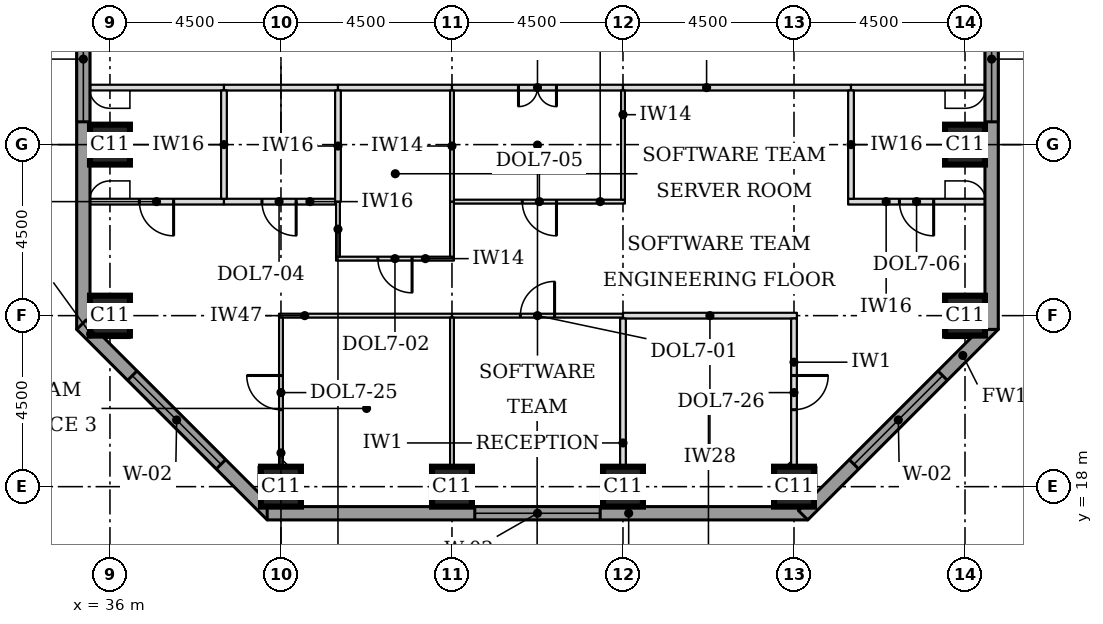
"""IFC4 building model, lengths in metres.
Left out: names, types, materials, properties, quantities, classifications, styles, units other than length and angle.
Written with IfcOpenShell. Run it as: python <this file> out.ifc"""

import sys

from ifc_helpers import new_model, si_unit, direction, frame, frame_2d, origin, origin_2d, place, context, subcontext, project, spatial, rectangle, extrude, element, fill, save


model = new_model("IFC4")
c1 = context("Model", 3, precision=1e-05, world=origin(), true_north=direction((0.0, 1.0)))
c2 = subcontext(c1, "Body", "Model", "MODEL_VIEW")
j1 = project(units=[si_unit("LENGTHUNIT", "METRE"), si_unit("PLANEANGLEUNIT", "RADIAN")], contexts=[c1])
p1 = place(None, origin())
s1 = spatial("IfcSite", under=j1, at=p1, CompositionType="ELEMENT")
p2 = place(p1, origin())
s2 = spatial("IfcBuilding", under=s1, at=p2, CompositionType="ELEMENT")
p3 = place(p2, frame((0.0, 0.0, 134.4)))
s3 = spatial("IfcBuildingStorey", under=s2, at=p3, CompositionType="ELEMENT", Elevation=134.4)
for number, where, z_axis, x_axis in (
    (1, (40.5, 18.0, 0.0), (0.0, 0.0, 1.0), (1.0, 0.0, 0.0)),
    (2, (45.0, 18.0, 0.0), (0.0, 0.0, 1.0), (1.0, 0.0, 0.0)),
    (3, (49.5, 18.0, 0.0), (0.0, 0.0, 1.0), (1.0, 0.0, 0.0)),
    (4, (54.0, 18.0, 0.0), (0.0, 0.0, 1.0), (1.0, 0.0, 0.0)),
    (5, (36.0, 22.5, 0.0), (0.0, 0.0, 1.0), (1.0, 0.0, 0.0)),
    (6, (58.5, 22.5, 0.0), (0.0, 0.0, 1.0), (1.0, 0.0, 0.0)),
    (7, (36.0, 27.0, 0.0), (0.0, 0.0, 1.0), (1.0, 0.0, 0.0)),
    (8, (58.5, 27.0, 0.0), (0.0, 0.0, 1.0), (1.0, 0.0, 0.0)),
):
    element("IfcColumn", number, at=place(p3, frame(where, z_axis=z_axis, x_axis=x_axis)), inside=s3, PredefinedType="COLUMN", context=c2, shape_type="SweptSolid", body=[
        extrude(rectangle(XDim=1.05, YDim=1.05, at=origin_2d()), origin(), (0.0, 0.0, 1.0), 3.7),
    ])
p4 = place(p3, frame((35.3, 39.975, 0.0), z_axis=(0.0, 0.0, 1.0), x_axis=(0.0, -1.0, 0.0)))
e9 = element("IfcWall", 9, at=p4, inside=s3, PredefinedType="STANDARD", context=c2, shape_type="SweptSolid", body=[
    extrude(rectangle(XDim=17.837, YDim=0.35, at=frame_2d((8.919, 0.0))), origin(), (0.0, 0.0, 1.0), 3.525),
])
p5 = place(p4, frame((0.5, 0.0, 0.9)))
e10 = element("IfcOpeningElement", 10, at=p5, cuts=e9, PredefinedType="OPENING", context=c2, shape_type="SweptSolid", body=[
    extrude(rectangle(XDim=3.3, YDim=1.9, at=frame_2d((1.65, 0.95))), frame((0.0, 0.185, 0.0), z_axis=(0.0, -1.0, 0.0), x_axis=(1.0, 0.0, 0.0)), (0.0, 0.0, 1.0), 0.37),
])
p6 = place(p4, frame((9.075, 0.0, 0.9)))
e11 = element("IfcOpeningElement", 11, at=p6, cuts=e9, PredefinedType="OPENING", context=c2, shape_type="SweptSolid", body=[
    extrude(rectangle(XDim=3.3, YDim=1.9, at=frame_2d((1.65, 0.95))), frame((0.0, 0.185, 0.0), z_axis=(0.0, -1.0, 0.0), x_axis=(1.0, 0.0, 0.0)), (0.0, 0.0, 1.0), 0.37),
])
p7 = place(p3, frame((35.249, 22.261, 0.0), z_axis=(0.0, 0.0, 1.0), x_axis=(0.707106781187, -0.707106781187, 0.0)))
e12 = element("IfcWall", 12, at=p7, inside=s3, PredefinedType="STANDARD", context=c2, shape_type="SweptSolid", body=[
    extrude(rectangle(XDim=7.089, YDim=0.35, at=frame_2d((3.544, 0.0))), origin(), (0.0, 0.0, 1.0), 3.525),
])
p8 = place(p7, frame((1.894, 0.0, 0.9)))
e13 = element("IfcOpeningElement", 13, at=p8, cuts=e12, PredefinedType="OPENING", context=c2, shape_type="SweptSolid", body=[
    extrude(rectangle(XDim=3.3, YDim=1.9, at=frame_2d((1.65, 0.95))), frame((0.0, 0.185, 0.0), z_axis=(0.0, -1.0, 0.0), x_axis=(1.0, 0.0, 0.0)), (0.0, 0.0, 1.0), 0.37),
])
p9 = place(p3, frame((40.138, 17.3, 0.0), z_axis=(0.0, 0.0, 1.0), x_axis=(1.0, 0.0, 0.0)))
e14 = element("IfcWall", 14, at=p9, inside=s3, PredefinedType="STANDARD", context=c2, shape_type="SweptSolid", body=[
    extrude(rectangle(XDim=14.225, YDim=0.35, at=frame_2d((7.112, 0.0))), origin(), (0.0, 0.0, 1.0), 3.525),
])
p10 = place(p9, frame((5.462, 0.0, 0.9)))
e15 = element("IfcOpeningElement", 15, at=p10, cuts=e14, PredefinedType="OPENING", context=c2, shape_type="SweptSolid", body=[
    extrude(rectangle(XDim=3.3, YDim=1.9, at=frame_2d((1.65, 0.95))), frame((0.0, 0.185, 0.0), z_axis=(0.0, -1.0, 0.0), x_axis=(1.0, 0.0, 0.0)), (0.0, 0.0, 1.0), 0.37),
])
p11 = place(p3, frame((54.239, 17.249, 0.0), z_axis=(0.0, 0.0, 1.0), x_axis=(0.707106781187, 0.707106781187, 0.0)))
e16 = element("IfcWall", 16, at=p11, inside=s3, PredefinedType="STANDARD", context=c2, shape_type="SweptSolid", body=[
    extrude(rectangle(XDim=7.089, YDim=0.35, at=frame_2d((3.544, 0.0))), origin(), (0.0, 0.0, 1.0), 3.525),
])
p12 = place(p11, frame((1.894, 0.0, 0.9)))
e17 = element("IfcOpeningElement", 17, at=p12, cuts=e16, PredefinedType="OPENING", context=c2, shape_type="SweptSolid", body=[
    extrude(rectangle(XDim=3.3, YDim=1.9, at=frame_2d((1.65, 0.95))), frame((0.0, 0.185, 0.0), z_axis=(0.0, -1.0, 0.0), x_axis=(1.0, 0.0, 0.0)), (0.0, 0.0, 1.0), 0.37),
])
p13 = place(p3, frame((59.2, 22.138, 0.0), z_axis=(0.0, 0.0, 1.0), x_axis=(0.0, 1.0, 0.0)))
e18 = element("IfcWall", 18, at=p13, inside=s3, PredefinedType="STANDARD", context=c2, shape_type="SweptSolid", body=[
    extrude(rectangle(XDim=17.837, YDim=0.35, at=frame_2d((8.919, 0.0))), origin(), (0.0, 0.0, 1.0), 3.525),
])
p14 = place(p13, frame((5.462, 0.0, 0.9)))
e19 = element("IfcOpeningElement", 19, at=p14, cuts=e18, PredefinedType="OPENING", context=c2, shape_type="SweptSolid", body=[
    extrude(rectangle(XDim=3.3, YDim=1.9, at=frame_2d((1.65, 0.95))), frame((0.0, 0.185, 0.0), z_axis=(0.0, -1.0, 0.0), x_axis=(1.0, 0.0, 0.0)), (0.0, 0.0, 1.0), 0.37),
])
p15 = place(p13, frame((14.037, 0.0, 0.9)))
e20 = element("IfcOpeningElement", 20, at=p15, cuts=e18, PredefinedType="OPENING", context=c2, shape_type="SweptSolid", body=[
    extrude(rectangle(XDim=3.3, YDim=1.9, at=frame_2d((1.65, 0.95))), frame((0.0, 0.185, 0.0), z_axis=(0.0, -1.0, 0.0), x_axis=(1.0, 0.0, 0.0)), (0.0, 0.0, 1.0), 0.37),
])
p16 = place(p3, frame((40.45, 22.5, 0.0), z_axis=(0.0, 0.0, 1.0), x_axis=(1.0, 0.0, 0.0)))
e21 = element("IfcWall", 21, at=p16, inside=s3, PredefinedType="PARTITIONING", context=c2, shape_type="SweptSolid", body=[
    extrude(rectangle(XDim=4.55, YDim=0.1, at=frame_2d((2.275, 0.0))), origin(), (0.0, 0.0, 1.0), 2.55),
])
p17 = place(p3, frame((45.0, 22.5, 0.0), z_axis=(0.0, 0.0, 1.0), x_axis=(1.0, 0.0, 0.0)))
e22 = element("IfcWall", 22, at=p17, inside=s3, PredefinedType="PARTITIONING", context=c2, shape_type="SweptSolid", body=[
    extrude(rectangle(XDim=4.5, YDim=0.1, at=frame_2d((2.25, 0.0))), origin(), (0.0, 0.0, 1.0), 2.55),
])
p18 = place(p17, frame((1.8, 0.0, 0.0)))
e23 = element("IfcOpeningElement", 23, at=p18, cuts=e22, PredefinedType="OPENING", context=c2, shape_type="SweptSolid", body=[
    extrude(rectangle(XDim=0.9, YDim=2.1, at=frame_2d((0.45, 1.05))), frame((0.0, 0.06, 0.0), z_axis=(0.0, -1.0, 0.0), x_axis=(1.0, 0.0, 0.0)), (0.0, 0.0, 1.0), 0.12),
])
p19 = place(p3, frame((49.5, 22.5, 0.0), z_axis=(0.0, 0.0, 1.0), x_axis=(1.0, 0.0, 0.0)))
e24 = element("IfcWall", 24, at=p19, inside=s3, PredefinedType="PARTITIONING", context=c2, shape_type="SweptSolid", body=[
    extrude(rectangle(XDim=4.575, YDim=0.15, at=frame_2d((2.288, 0.0))), origin(), (0.0, 0.0, 1.0), 2.55),
])
p20 = place(p3, frame((41.95, 24.0, 0.0), z_axis=(0.0, 0.0, 1.0), x_axis=(1.0, 0.0, 0.0)))
e25 = element("IfcWall", 25, at=p20, inside=s3, PredefinedType="PARTITIONING", context=c2, shape_type="SweptSolid", body=[
    extrude(rectangle(XDim=3.1, YDim=0.1, at=frame_2d((1.55, 0.0))), origin(), (0.0, 0.0, 1.0), 3.55),
])
p21 = place(p20, frame((1.1, 0.0, 0.0)))
e26 = element("IfcOpeningElement", 26, at=p21, cuts=e25, PredefinedType="OPENING", context=c2, shape_type="SweptSolid", body=[
    extrude(rectangle(XDim=0.9, YDim=2.1, at=frame_2d((0.45, 1.05))), frame((0.0, 0.06, 0.0), z_axis=(0.0, -1.0, 0.0), x_axis=(1.0, 0.0, 0.0)), (0.0, 0.0, 1.0), 0.12),
])
p22 = place(p3, frame((35.475, 25.5, 0.0), z_axis=(0.0, 0.0, 1.0), x_axis=(1.0, 0.0, 0.0)))
e27 = element("IfcWall", 27, at=p22, inside=s3, PredefinedType="PARTITIONING", context=c2, shape_type="SweptSolid", body=[
    extrude(rectangle(XDim=3.525, YDim=0.15, at=frame_2d((1.762, 0.0))), origin(), (0.0, 0.0, 1.0), 3.55),
])
p23 = place(p22, frame((1.3, 0.0, 0.0)))
e28 = element("IfcOpeningElement", 28, at=p23, cuts=e27, PredefinedType="OPENING", context=c2, shape_type="SweptSolid", body=[
    extrude(rectangle(XDim=0.9, YDim=2.1, at=frame_2d((0.45, 1.05))), frame((0.0, 0.085, 0.0), z_axis=(0.0, -1.0, 0.0), x_axis=(1.0, 0.0, 0.0)), (0.0, 0.0, 1.0), 0.17),
])
p24 = place(p3, frame((39.0, 25.5, 0.0), z_axis=(0.0, 0.0, 1.0), x_axis=(1.0, 0.0, 0.0)))
e29 = element("IfcWall", 29, at=p24, inside=s3, PredefinedType="PARTITIONING", context=c2, shape_type="SweptSolid", body=[
    extrude(rectangle(XDim=2.925, YDim=0.15, at=frame_2d((1.462, 0.0))), origin(), (0.0, 0.0, 1.0), 3.55),
])
p25 = place(p24, frame((1.0, 0.0, 0.0)))
e30 = element("IfcOpeningElement", 30, at=p25, cuts=e29, PredefinedType="OPENING", context=c2, shape_type="SweptSolid", body=[
    extrude(rectangle(XDim=0.9, YDim=2.1, at=frame_2d((0.45, 1.05))), frame((0.0, 0.085, 0.0), z_axis=(0.0, -1.0, 0.0), x_axis=(1.0, 0.0, 0.0)), (0.0, 0.0, 1.0), 0.17),
])
p26 = place(p3, frame((45.05, 25.5, 0.0), z_axis=(0.0, 0.0, 1.0), x_axis=(1.0, 0.0, 0.0)))
e31 = element("IfcWall", 31, at=p26, inside=s3, PredefinedType="PARTITIONING", context=c2, shape_type="SweptSolid", body=[
    extrude(rectangle(XDim=4.5, YDim=0.1, at=frame_2d((2.25, 0.0))), origin(), (0.0, 0.0, 1.0), 3.55),
])
p27 = place(p26, frame((1.8, 0.0, 0.0)))
e32 = element("IfcOpeningElement", 32, at=p27, cuts=e31, PredefinedType="OPENING", context=c2, shape_type="SweptSolid", body=[
    extrude(rectangle(XDim=0.9, YDim=2.1, at=frame_2d((0.45, 1.05))), frame((0.0, 0.06, 0.0), z_axis=(0.0, -1.0, 0.0), x_axis=(1.0, 0.0, 0.0)), (0.0, 0.0, 1.0), 0.12),
])
p28 = place(p3, frame((55.425, 25.5, 0.0), z_axis=(0.0, 0.0, 1.0), x_axis=(1.0, 0.0, 0.0)))
e33 = element("IfcWall", 33, at=p28, inside=s3, PredefinedType="PARTITIONING", context=c2, shape_type="SweptSolid", body=[
    extrude(rectangle(XDim=3.6, YDim=0.15, at=frame_2d((1.8, 0.0))), origin(), (0.0, 0.0, 1.0), 3.55),
])
p29 = place(p28, frame((1.35, 0.0, 0.0)))
e34 = element("IfcOpeningElement", 34, at=p29, cuts=e33, PredefinedType="OPENING", context=c2, shape_type="SweptSolid", body=[
    extrude(rectangle(XDim=0.9, YDim=2.1, at=frame_2d((0.45, 1.05))), frame((0.0, 0.085, 0.0), z_axis=(0.0, -1.0, 0.0), x_axis=(1.0, 0.0, 0.0)), (0.0, 0.0, 1.0), 0.17),
])
p30 = place(p3, frame((35.475, 28.5, 0.0), z_axis=(0.0, 0.0, 1.0), x_axis=(1.0, 0.0, 0.0)))
e35 = element("IfcWall", 35, at=p30, inside=s3, PredefinedType="PARTITIONING", context=c2, shape_type="SweptSolid", body=[
    extrude(rectangle(XDim=3.525, YDim=0.15, at=frame_2d((1.762, 0.0))), origin(), (0.0, 0.0, 1.0), 3.55),
])
for number, where, z_axis, x_axis in (
    (36, (39.0, 28.5, 0.0), (0.0, 0.0, 1.0), (1.0, 0.0, 0.0)),
    (37, (42.0, 28.5, 0.0), (0.0, 0.0, 1.0), (1.0, 0.0, 0.0)),
):
    element("IfcWall", number, at=place(p3, frame(where, z_axis=z_axis, x_axis=x_axis)), inside=s3, PredefinedType="PARTITIONING", context=c2, shape_type="SweptSolid", body=[
        extrude(rectangle(XDim=3.0, YDim=0.15, at=frame_2d((1.5, 0.0))), origin(), (0.0, 0.0, 1.0), 3.55),
    ])
p31 = place(p3, frame((45.0, 28.5, 0.0), z_axis=(0.0, 0.0, 1.0), x_axis=(1.0, 0.0, 0.0)))
e38 = element("IfcWall", 38, at=p31, inside=s3, PredefinedType="PARTITIONING", context=c2, shape_type="SweptSolid", body=[
    extrude(rectangle(XDim=4.5, YDim=0.15, at=frame_2d((2.25, 0.0))), origin(), (0.0, 0.0, 1.0), 3.55),
])
p32 = place(p31, frame((1.75, 0.0, 0.0)))
e39 = element("IfcOpeningElement", 39, at=p32, cuts=e38, PredefinedType="OPENING", context=c2, shape_type="SweptSolid", body=[
    extrude(rectangle(XDim=1.0, YDim=2.1, at=frame_2d((0.5, 1.05))), frame((0.0, 0.085, 0.0), z_axis=(0.0, -1.0, 0.0), x_axis=(1.0, 0.0, 0.0)), (0.0, 0.0, 1.0), 0.17),
])
p33 = place(p3, frame((49.5, 28.5, 0.0), z_axis=(0.0, 0.0, 1.0), x_axis=(1.0, 0.0, 0.0)))
e40 = element("IfcWall", 40, at=p33, inside=s3, PredefinedType="PARTITIONING", context=c2, shape_type="SweptSolid", body=[
    extrude(rectangle(XDim=6.0, YDim=0.15, at=frame_2d((3.0, 0.0))), origin(), (0.0, 0.0, 1.0), 3.55),
])
p34 = place(p3, frame((55.5, 28.5, 0.0), z_axis=(0.0, 0.0, 1.0), x_axis=(1.0, 0.0, 0.0)))
e41 = element("IfcWall", 41, at=p34, inside=s3, PredefinedType="PARTITIONING", context=c2, shape_type="SweptSolid", body=[
    extrude(rectangle(XDim=3.525, YDim=0.15, at=frame_2d((1.762, 0.0))), origin(), (0.0, 0.0, 1.0), 3.55),
])
p35 = place(p3, frame((45.0, 17.475, 0.0), z_axis=(0.0, 0.0, 1.0), x_axis=(0.0, 1.0, 0.0)))
e42 = element("IfcWall", 42, at=p35, inside=s3, PredefinedType="PARTITIONING", context=c2, shape_type="SweptSolid", body=[
    extrude(rectangle(XDim=4.975, YDim=0.1, at=frame_2d((2.487, 0.0))), origin(), (0.0, 0.0, 1.0), 3.55),
])
p36 = place(p3, frame((49.5, 17.475, 0.0), z_axis=(0.0, 0.0, 1.0), x_axis=(0.0, 1.0, 0.0)))
e43 = element("IfcWall", 43, at=p36, inside=s3, PredefinedType="PARTITIONING", context=c2, shape_type="SweptSolid", body=[
    extrude(rectangle(XDim=4.95, YDim=0.15, at=frame_2d((2.475, 0.0))), origin(), (0.0, 0.0, 1.0), 3.55),
])
p37 = place(p3, frame((40.5, 18.525, 0.0), z_axis=(0.0, 0.0, 1.0), x_axis=(0.0, 1.0, 0.0)))
e44 = element("IfcWall", 44, at=p37, inside=s3, PredefinedType="PARTITIONING", context=c2, shape_type="SweptSolid", body=[
    extrude(rectangle(XDim=3.925, YDim=0.1, at=frame_2d((1.962, 0.0))), origin(), (0.0, 0.0, 1.0), 3.55),
])
p38 = place(p37, frame((1.5, 0.0, 0.0)))
e45 = element("IfcOpeningElement", 45, at=p38, cuts=e44, PredefinedType="OPENING", context=c2, shape_type="SweptSolid", body=[
    extrude(rectangle(XDim=0.9, YDim=2.1, at=frame_2d((0.45, 1.05))), frame((0.0, 0.06, 0.0), z_axis=(0.0, -1.0, 0.0), x_axis=(1.0, 0.0, 0.0)), (0.0, 0.0, 1.0), 0.12),
])
p39 = place(p3, frame((54.0, 18.525, 0.0), z_axis=(0.0, 0.0, 1.0), x_axis=(0.0, 1.0, 0.0)))
e46 = element("IfcWall", 46, at=p39, inside=s3, PredefinedType="PARTITIONING", context=c2, shape_type="SweptSolid", body=[
    extrude(rectangle(XDim=3.9, YDim=0.15, at=frame_2d((1.95, 0.0))), origin(), (0.0, 0.0, 1.0), 3.55),
])
p40 = place(p39, frame((1.5, 0.0, 0.0)))
e47 = element("IfcOpeningElement", 47, at=p40, cuts=e46, PredefinedType="OPENING", context=c2, shape_type="SweptSolid", body=[
    extrude(rectangle(XDim=0.9, YDim=2.1, at=frame_2d((0.45, 1.05))), frame((0.0, 0.085, 0.0), z_axis=(0.0, -1.0, 0.0), x_axis=(1.0, 0.0, 0.0)), (0.0, 0.0, 1.0), 0.17),
])
for number, where, z_axis, x_axis in (
    (48, (42.0, 24.05, 0.0), (0.0, 0.0, 1.0), (0.0, 1.0, 0.0)),
    (49, (45.0, 24.05, 0.0), (0.0, 0.0, 1.0), (0.0, 1.0, 0.0)),
):
    element("IfcWall", number, at=place(p3, frame(where, z_axis=z_axis, x_axis=x_axis)), inside=s3, PredefinedType="PARTITIONING", context=c2, shape_type="SweptSolid", body=[
        extrude(rectangle(XDim=1.45, YDim=0.1, at=frame_2d((0.725, 0.0))), origin(), (0.0, 0.0, 1.0), 3.55),
    ])
p41 = place(p3, frame((42.0, 25.5, 0.0), z_axis=(0.0, 0.0, 1.0), x_axis=(0.0, 1.0, 0.0)))
e50 = element("IfcWall", 50, at=p41, inside=s3, PredefinedType="PARTITIONING", context=c2, shape_type="SweptSolid", body=[
    extrude(rectangle(XDim=2.925, YDim=0.15, at=frame_2d((1.462, 0.0))), origin(), (0.0, 0.0, 1.0), 3.55),
])
p42 = place(p3, frame((45.0, 25.5, 0.0), z_axis=(0.0, 0.0, 1.0), x_axis=(0.0, 1.0, 0.0)))
e51 = element("IfcWall", 51, at=p42, inside=s3, PredefinedType="PARTITIONING", context=c2, shape_type="SweptSolid", body=[
    extrude(rectangle(XDim=2.925, YDim=0.1, at=frame_2d((1.462, 0.0))), origin(), (0.0, 0.0, 1.0), 3.55),
])
p43 = place(p3, frame((49.5, 25.55, 0.0), z_axis=(0.0, 0.0, 1.0), x_axis=(0.0, 1.0, 0.0)))
e52 = element("IfcWall", 52, at=p43, inside=s3, PredefinedType="PARTITIONING", context=c2, shape_type="SweptSolid", body=[
    extrude(rectangle(XDim=2.875, YDim=0.1, at=frame_2d((1.438, 0.0))), origin(), (0.0, 0.0, 1.0), 3.55),
])
for number, where, z_axis, x_axis in (
    (53, (39.0, 25.575, 0.0), (0.0, 0.0, 1.0), (0.0, 1.0, 0.0)),
    (54, (55.5, 25.575, 0.0), (0.0, 0.0, 1.0), (0.0, 1.0, 0.0)),
):
    element("IfcWall", number, at=place(p3, frame(where, z_axis=z_axis, x_axis=x_axis)), inside=s3, PredefinedType="PARTITIONING", context=c2, shape_type="SweptSolid", body=[
        extrude(rectangle(XDim=2.85, YDim=0.15, at=frame_2d((1.425, 0.0))), origin(), (0.0, 0.0, 1.0), 3.55),
    ])
p44 = place(p6, origin())
e55 = element("IfcWindow", 55, at=p44, inside=s3, PartitioningType="SINGLE_PANEL", PredefinedType="WINDOW", context=c2, shape_type="SweptSolid", body=[
    extrude(rectangle(XDim=3.3, YDim=1.9, at=frame_2d((1.65, 0.95))), frame((0.0, 0.085, 0.0), z_axis=(0.0, -1.0, 0.0), x_axis=(1.0, 0.0, 0.0)), (0.0, 0.0, 1.0), 0.06),
])
fill(e11, e55)
p45 = place(p8, origin())
e56 = element("IfcWindow", 56, at=p45, inside=s3, PartitioningType="SINGLE_PANEL", PredefinedType="WINDOW", context=c2, shape_type="SweptSolid", body=[
    extrude(rectangle(XDim=3.3, YDim=1.9, at=frame_2d((1.65, 0.95))), frame((0.0, 0.085, 0.0), z_axis=(0.0, -1.0, 0.0), x_axis=(1.0, 0.0, 0.0)), (0.0, 0.0, 1.0), 0.06),
])
fill(e13, e56)
p46 = place(p10, origin())
e57 = element("IfcWindow", 57, at=p46, inside=s3, PartitioningType="SINGLE_PANEL", PredefinedType="WINDOW", context=c2, shape_type="SweptSolid", body=[
    extrude(rectangle(XDim=3.3, YDim=1.9, at=frame_2d((1.65, 0.95))), frame((0.0, 0.085, 0.0), z_axis=(0.0, -1.0, 0.0), x_axis=(1.0, 0.0, 0.0)), (0.0, 0.0, 1.0), 0.06),
])
fill(e15, e57)
p47 = place(p12, origin())
e58 = element("IfcWindow", 58, at=p47, inside=s3, PartitioningType="SINGLE_PANEL", PredefinedType="WINDOW", context=c2, shape_type="SweptSolid", body=[
    extrude(rectangle(XDim=3.3, YDim=1.9, at=frame_2d((1.65, 0.95))), frame((0.0, 0.085, 0.0), z_axis=(0.0, -1.0, 0.0), x_axis=(1.0, 0.0, 0.0)), (0.0, 0.0, 1.0), 0.06),
])
fill(e17, e58)
p48 = place(p14, origin())
e59 = element("IfcWindow", 59, at=p48, inside=s3, PartitioningType="SINGLE_PANEL", PredefinedType="WINDOW", context=c2, shape_type="SweptSolid", body=[
    extrude(rectangle(XDim=3.3, YDim=1.9, at=frame_2d((1.65, 0.95))), frame((0.0, 0.085, 0.0), z_axis=(0.0, -1.0, 0.0), x_axis=(1.0, 0.0, 0.0)), (0.0, 0.0, 1.0), 0.06),
])
fill(e19, e59)
p49 = place(p32, frame((1.0, 0.0, 0.0), z_axis=(0.0, 0.0, 1.0), x_axis=(-1.0, 0.0, 0.0)))
e60 = element("IfcDoor", 60, at=p49, inside=s3, OperationType="DOUBLE_DOOR_SINGLE_SWING", PredefinedType="DOOR", context=c2, shape_type="SweptSolid", body=[
    extrude(rectangle(XDim=1.0, YDim=2.1, at=frame_2d((0.5, 1.05))), frame((0.0, 0.025, 0.0), z_axis=(0.0, -1.0, 0.0), x_axis=(1.0, 0.0, 0.0)), (0.0, 0.0, 1.0), 0.05),
])
fill(e39, e60)
p50 = place(p27, frame((0.9, 0.0, 0.0), z_axis=(0.0, 0.0, 1.0), x_axis=(-1.0, 0.0, 0.0)))
e61 = element("IfcDoor", 61, at=p50, inside=s3, OperationType="SINGLE_SWING_LEFT", PredefinedType="DOOR", context=c2, shape_type="SweptSolid", body=[
    extrude(rectangle(XDim=0.9, YDim=2.1, at=frame_2d((0.45, 1.05))), frame((0.0, 0.025, 0.0), z_axis=(0.0, -1.0, 0.0), x_axis=(1.0, 0.0, 0.0)), (0.0, 0.0, 1.0), 0.05),
])
fill(e32, e61)
p51 = place(p25, frame((0.9, 0.0, 0.0), z_axis=(0.0, 0.0, 1.0), x_axis=(-1.0, 0.0, 0.0)))
e62 = element("IfcDoor", 62, at=p51, inside=s3, OperationType="SINGLE_SWING_LEFT", PredefinedType="DOOR", context=c2, shape_type="SweptSolid", body=[
    extrude(rectangle(XDim=0.9, YDim=2.1, at=frame_2d((0.45, 1.05))), frame((0.0, 0.025, 0.0), z_axis=(0.0, -1.0, 0.0), x_axis=(1.0, 0.0, 0.0)), (0.0, 0.0, 1.0), 0.05),
])
fill(e30, e62)
p52 = place(p38, origin())
e63 = element("IfcDoor", 63, at=p52, inside=s3, OperationType="SINGLE_SWING_RIGHT", PredefinedType="DOOR", context=c2, shape_type="SweptSolid", body=[
    extrude(rectangle(XDim=0.9, YDim=2.1, at=frame_2d((0.45, 1.05))), frame((0.0, 0.025, 0.0), z_axis=(0.0, -1.0, 0.0), x_axis=(1.0, 0.0, 0.0)), (0.0, 0.0, 1.0), 0.05),
])
fill(e45, e63)
p53 = place(p18, origin())
e64 = element("IfcDoor", 64, at=p53, inside=s3, OperationType="SINGLE_SWING_RIGHT", PredefinedType="DOOR", context=c2, shape_type="SweptSolid", body=[
    extrude(rectangle(XDim=0.9, YDim=2.1, at=frame_2d((0.45, 1.05))), frame((0.0, 0.025, 0.0), z_axis=(0.0, -1.0, 0.0), x_axis=(1.0, 0.0, 0.0)), (0.0, 0.0, 1.0), 0.05),
])
fill(e23, e64)
p54 = place(p29, frame((0.9, 0.0, 0.0), z_axis=(0.0, 0.0, 1.0), x_axis=(-1.0, 0.0, 0.0)))
e65 = element("IfcDoor", 65, at=p54, inside=s3, OperationType="SINGLE_SWING_LEFT", PredefinedType="DOOR", context=c2, shape_type="SweptSolid", body=[
    extrude(rectangle(XDim=0.9, YDim=2.1, at=frame_2d((0.45, 1.05))), frame((0.0, 0.025, 0.0), z_axis=(0.0, -1.0, 0.0), x_axis=(1.0, 0.0, 0.0)), (0.0, 0.0, 1.0), 0.05),
])
fill(e34, e65)
p55 = place(p40, frame((0.9, 0.0, 0.0), z_axis=(0.0, 0.0, 1.0), x_axis=(-1.0, 0.0, 0.0)))
e66 = element("IfcDoor", 66, at=p55, inside=s3, OperationType="SINGLE_SWING_LEFT", PredefinedType="DOOR", context=c2, shape_type="SweptSolid", body=[
    extrude(rectangle(XDim=0.9, YDim=2.1, at=frame_2d((0.45, 1.05))), frame((0.0, 0.025, 0.0), z_axis=(0.0, -1.0, 0.0), x_axis=(1.0, 0.0, 0.0)), (0.0, 0.0, 1.0), 0.05),
])
fill(e47, e66)
p56 = place(p21, frame((0.9, 0.0, 0.0), z_axis=(0.0, 0.0, 1.0), x_axis=(-1.0, 0.0, 0.0)))
e67 = element("IfcDoor", 67, at=p56, inside=s3, OperationType="SINGLE_SWING_LEFT", PredefinedType="DOOR", context=c2, shape_type="SweptSolid", body=[
    extrude(rectangle(XDim=0.9, YDim=2.1, at=frame_2d((0.45, 1.05))), frame((0.0, 0.025, 0.0), z_axis=(0.0, -1.0, 0.0), x_axis=(1.0, 0.0, 0.0)), (0.0, 0.0, 1.0), 0.05),
])
fill(e26, e67)
p57 = place(p23, frame((0.9, 0.0, 0.0), z_axis=(0.0, 0.0, 1.0), x_axis=(-1.0, 0.0, 0.0)))
e68 = element("IfcDoor", 68, at=p57, inside=s3, OperationType="SINGLE_SWING_LEFT", PredefinedType="DOOR", context=c2, shape_type="SweptSolid", body=[
    extrude(rectangle(XDim=0.9, YDim=2.1, at=frame_2d((0.45, 1.05))), frame((0.0, 0.025, 0.0), z_axis=(0.0, -1.0, 0.0), x_axis=(1.0, 0.0, 0.0)), (0.0, 0.0, 1.0), 0.05),
])
fill(e28, e68)
save(model, sys.argv[1])
